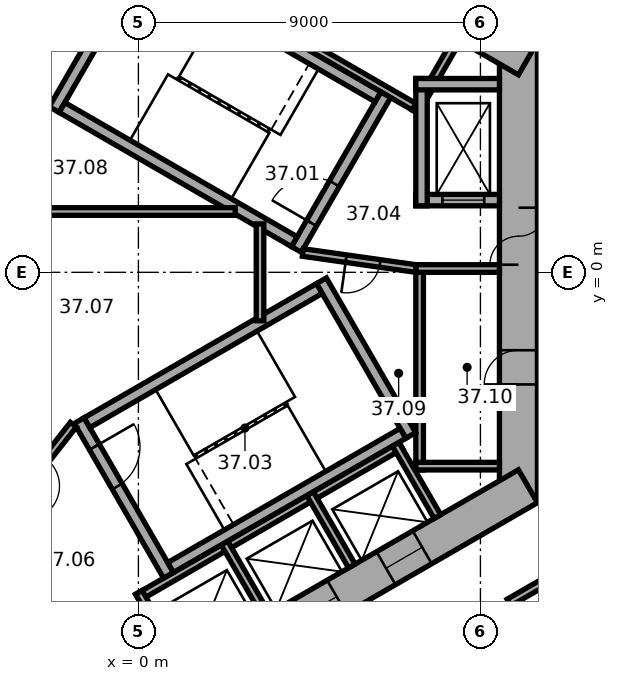
"""IFC4 building model, lengths in metres.
Left out: names, types, materials, properties, quantities, classifications, styles, units other than length and angle.
Written with IfcOpenShell. Run it as: python <this file> out.ifc"""

import sys

from ifc_helpers import new_model, si_unit, direction, frame, frame_2d, origin, place, context, subcontext, project, spatial, rectangle, extrude, element, fill, save


model = new_model("IFC4")
c1 = context("Model", 3, precision=1e-05, world=origin(), true_north=direction((0.0, 1.0)))
c2 = subcontext(c1, "Body", "Model", "MODEL_VIEW")
j1 = project(units=[si_unit("LENGTHUNIT", "METRE"), si_unit("PLANEANGLEUNIT", "RADIAN")], contexts=[c1])
p1 = place(None, origin())
s1 = spatial("IfcSite", under=j1, at=p1, CompositionType="ELEMENT")
p2 = place(p1, origin())
s2 = spatial("IfcBuilding", under=s1, at=p2, CompositionType="ELEMENT")
p3 = place(p2, frame((0.0, 0.0, 154.0)))
s3 = spatial("IfcBuildingStorey", under=s2, at=p3, CompositionType="ELEMENT", Elevation=154.0)
p4 = place(p3, frame((10.0, -6.062, 0.0), z_axis=(0.0, 0.0, 1.0), x_axis=(0.0, 1.0, 0.0)))
e1 = element("IfcWall", 1, at=p4, inside=s3, PredefinedType="SHEAR", context=c2, shape_type="SweptSolid", body=[
    extrude(rectangle(XDim=12.125, YDim=1.0, at=frame_2d((6.062, 0.0))), origin(), (0.0, 0.0, 1.0), 3.7),
])
p5 = place(p4, frame((6.262, 0.0, 0.0)))
e2 = element("IfcOpeningElement", 2, at=p5, cuts=e1, PredefinedType="OPENING", context=c2, shape_type="SweptSolid", body=[
    extrude(rectangle(XDim=1.5, YDim=2.1, at=frame_2d((0.75, 1.05))), frame((0.0, 0.51, 0.0), z_axis=(0.0, -1.0, 0.0), x_axis=(1.0, 0.0, 0.0)), (0.0, 0.0, 1.0), 1.02),
])
p6 = place(p4, frame((3.112, 0.0, 0.0)))
e3 = element("IfcOpeningElement", 3, at=p6, cuts=e1, PredefinedType="OPENING", context=c2, shape_type="SweptSolid", body=[
    extrude(rectangle(XDim=0.9, YDim=2.1, at=frame_2d((0.45, 1.05))), frame((0.0, 0.51, 0.0), z_axis=(0.0, -1.0, 0.0), x_axis=(1.0, 0.0, 0.0)), (0.0, 0.0, 1.0), 1.02),
])
p7 = place(p3, frame((10.25, 5.629, 0.0), z_axis=(0.0, 0.0, 1.0), x_axis=(-0.866022616891, 0.50000482701, 0.0)))
e4 = element("IfcWall", 4, at=p7, inside=s3, PredefinedType="SHEAR", context=c2, shape_type="SweptSolid", body=[
    extrude(rectangle(XDim=12.125, YDim=1.0, at=frame_2d((6.062, 0.0))), origin(), (0.0, 0.0, 1.0), 3.7),
])
p8 = place(p7, frame((4.012, 0.0, 0.0)))
e5 = element("IfcOpeningElement", 5, at=p8, cuts=e4, PredefinedType="OPENING", context=c2, shape_type="SweptSolid", body=[
    extrude(rectangle(XDim=0.9, YDim=2.1, at=frame_2d((0.45, 1.05))), frame((0.0, 0.51, 0.0), z_axis=(0.0, -1.0, 0.0), x_axis=(1.0, 0.0, 0.0)), (0.0, 0.0, 1.0), 1.02),
])
p9 = place(p7, frame((7.912, 0.0, 0.0)))
e6 = element("IfcOpeningElement", 6, at=p9, cuts=e4, PredefinedType="OPENING", context=c2, shape_type="SweptSolid", body=[
    extrude(rectangle(XDim=0.9, YDim=2.1, at=frame_2d((0.45, 1.05))), frame((0.0, 0.51, 0.0), z_axis=(0.0, -1.0, 0.0), x_axis=(1.0, 0.0, 0.0)), (0.0, 0.0, 1.0), 1.02),
])
p10 = place(p3, frame((0.25, 11.691, 0.0), z_axis=(0.0, 0.0, 1.0), x_axis=(-0.866022616891, -0.50000482701, 0.0)))
e7 = element("IfcWall", 7, at=p10, inside=s3, PredefinedType="SHEAR", context=c2, shape_type="SweptSolid", body=[
    extrude(rectangle(XDim=12.125, YDim=1.0, at=frame_2d((6.062, 0.0))), origin(), (0.0, 0.0, 1.0), 3.7),
])
p11 = place(p10, frame((6.262, 0.0, 0.0)))
e8 = element("IfcOpeningElement", 8, at=p11, cuts=e7, PredefinedType="OPENING", context=c2, shape_type="SweptSolid", body=[
    extrude(rectangle(XDim=1.5, YDim=2.1, at=frame_2d((0.75, 1.05))), frame((0.0, 0.51, 0.0), z_axis=(0.0, -1.0, 0.0), x_axis=(1.0, 0.0, 0.0)), (0.0, 0.0, 1.0), 1.02),
])
p12 = place(p10, frame((1.812, 0.0, 0.0)))
e9 = element("IfcOpeningElement", 9, at=p12, cuts=e7, PredefinedType="OPENING", context=c2, shape_type="SweptSolid", body=[
    extrude(rectangle(XDim=0.9, YDim=2.1, at=frame_2d((0.45, 1.05))), frame((0.0, 0.51, 0.0), z_axis=(0.0, -1.0, 0.0), x_axis=(1.0, 0.0, 0.0)), (0.0, 0.0, 1.0), 1.02),
])
p13 = place(p10, frame((4.412, 0.0, 0.0)))
e10 = element("IfcOpeningElement", 10, at=p13, cuts=e7, PredefinedType="OPENING", context=c2, shape_type="SweptSolid", body=[
    extrude(rectangle(XDim=0.9, YDim=2.1, at=frame_2d((0.45, 1.05))), frame((0.0, 0.51, 0.0), z_axis=(0.0, -1.0, 0.0), x_axis=(1.0, 0.0, 0.0)), (0.0, 0.0, 1.0), 1.02),
])
p14 = place(p3, frame((-10.25, -5.629, 0.0), z_axis=(0.0, 0.0, 1.0), x_axis=(0.866022616891, -0.50000482701, 0.0)))
e11 = element("IfcWall", 11, at=p14, inside=s3, PredefinedType="SHEAR", context=c2, shape_type="SweptSolid", body=[
    extrude(rectangle(XDim=12.125, YDim=1.0, at=frame_2d((6.062, 0.0))), origin(), (0.0, 0.0, 1.0), 3.7),
])
p15 = place(p14, frame((6.262, 0.0, 0.0)))
e12 = element("IfcOpeningElement", 12, at=p15, cuts=e11, PredefinedType="OPENING", context=c2, shape_type="SweptSolid", body=[
    extrude(rectangle(XDim=1.5, YDim=2.1, at=frame_2d((0.75, 1.05))), frame((0.0, 0.51, 0.0), z_axis=(0.0, -1.0, 0.0), x_axis=(1.0, 0.0, 0.0)), (0.0, 0.0, 1.0), 1.02),
])
p16 = place(p14, frame((1.712, 0.0, 0.0)))
e13 = element("IfcOpeningElement", 13, at=p16, cuts=e11, PredefinedType="OPENING", context=c2, shape_type="SweptSolid", body=[
    extrude(rectangle(XDim=1.1, YDim=2.1, at=frame_2d((0.55, 1.05))), frame((0.0, 0.51, 0.0), z_axis=(0.0, -1.0, 0.0), x_axis=(1.0, 0.0, 0.0)), (0.0, 0.0, 1.0), 1.02),
])
p17 = place(p14, frame((4.312, 0.0, 0.0)))
e14 = element("IfcOpeningElement", 14, at=p17, cuts=e11, PredefinedType="OPENING", context=c2, shape_type="SweptSolid", body=[
    extrude(rectangle(XDim=1.1, YDim=2.1, at=frame_2d((0.55, 1.05))), frame((0.0, 0.51, 0.0), z_axis=(0.0, -1.0, 0.0), x_axis=(1.0, 0.0, 0.0)), (0.0, 0.0, 1.0), 1.02),
])
p18 = place(p3, frame((-0.25, -11.691, 0.0), z_axis=(0.0, 0.0, 1.0), x_axis=(0.866022616891, 0.50000482701, 0.0)))
e15 = element("IfcWall", 15, at=p18, inside=s3, PredefinedType="SHEAR", context=c2, shape_type="SweptSolid", body=[
    extrude(rectangle(XDim=12.125, YDim=1.0, at=frame_2d((6.062, 0.0))), origin(), (0.0, 0.0, 1.0), 3.7),
])
p19 = place(p18, frame((2.612, 0.0, 0.0)))
e16 = element("IfcOpeningElement", 16, at=p19, cuts=e15, PredefinedType="OPENING", context=c2, shape_type="SweptSolid", body=[
    extrude(rectangle(XDim=1.1, YDim=2.1, at=frame_2d((0.55, 1.05))), frame((0.0, 0.51, 0.0), z_axis=(0.0, -1.0, 0.0), x_axis=(1.0, 0.0, 0.0)), (0.0, 0.0, 1.0), 1.02),
])
p20 = place(p18, frame((5.212, 0.0, 0.0)))
e17 = element("IfcOpeningElement", 17, at=p20, cuts=e15, PredefinedType="OPENING", context=c2, shape_type="SweptSolid", body=[
    extrude(rectangle(XDim=1.1, YDim=2.1, at=frame_2d((0.55, 1.05))), frame((0.0, 0.51, 0.0), z_axis=(0.0, -1.0, 0.0), x_axis=(1.0, 0.0, 0.0)), (0.0, 0.0, 1.0), 1.02),
])
p21 = place(p18, frame((7.812, 0.0, 0.0)))
e18 = element("IfcOpeningElement", 18, at=p21, cuts=e15, PredefinedType="OPENING", context=c2, shape_type="SweptSolid", body=[
    extrude(rectangle(XDim=1.1, YDim=2.1, at=frame_2d((0.55, 1.05))), frame((0.0, 0.51, 0.0), z_axis=(0.0, -1.0, 0.0), x_axis=(1.0, 0.0, 0.0)), (0.0, 0.0, 1.0), 1.02),
])
p22 = place(p3, frame((7.4, -5.2, 0.0), z_axis=(0.0, 0.0, 1.0), x_axis=(0.0, 1.0, 0.0)))
e19 = element("IfcWall", 19, at=p22, inside=s3, PredefinedType="PARTITIONING", context=c2, shape_type="SweptSolid", body=[
    extrude(rectangle(XDim=5.4, YDim=0.2, at=frame_2d((2.7, 0.0))), origin(), (0.0, 0.0, 1.0), 3.42),
])
for number, where, z_axis, x_axis in (
    (20, (7.3, -5.1, 0.0), (0.0, 0.0, 1.0), (1.0, 0.0, 0.0)),
    (21, (7.3, 0.1, 0.0), (0.0, 0.0, 1.0), (1.0, 0.0, 0.0)),
):
    element("IfcWall", number, at=place(p3, frame(where, z_axis=z_axis, x_axis=x_axis)), inside=s3, PredefinedType="PARTITIONING", context=c2, shape_type="SweptSolid", body=[
        extrude(rectangle(XDim=2.2, YDim=0.2, at=frame_2d((1.1, 0.0))), origin(), (0.0, 0.0, 1.0), 3.42),
    ])
p23 = place(p3, frame((7.424, 4.259, 0.0), z_axis=(0.0, 0.0, 1.0), x_axis=(-0.866026010844, 0.49999894854, 0.0)))
e22 = element("IfcWall", 22, at=p23, inside=s3, PredefinedType="PARTITIONING", context=c2, shape_type="SweptSolid", body=[
    extrude(rectangle(XDim=8.0, YDim=0.2, at=frame_2d((4.0, 0.0))), origin(), (0.0, 0.0, 1.0), 3.42),
])
p24 = place(p3, frame((7.287, 4.222, 0.0), z_axis=(0.0, 0.0, 1.0), x_axis=(0.499946605688, 0.86605622881, 0.0)))
e23 = element("IfcWall", 23, at=p24, inside=s3, PredefinedType="PARTITIONING", context=c2, shape_type="SweptSolid", body=[
    extrude(rectangle(XDim=2.2, YDim=0.2, at=frame_2d((1.1, 0.0))), origin(), (0.0, 0.0, 1.0), 3.42),
])
p25 = place(p3, frame((-0.024, -8.559, 0.0), z_axis=(0.0, 0.0, 1.0), x_axis=(0.866026010844, 0.49999894854, 0.0)))
e24 = element("IfcWall", 24, at=p25, inside=s3, PredefinedType="PARTITIONING", context=c2, shape_type="SweptSolid", body=[
    extrude(rectangle(XDim=8.0, YDim=0.2, at=frame_2d((4.0, 0.0))), origin(), (0.0, 0.0, 1.0), 3.42),
])
for number, where, z_axis, x_axis in (
    (25, (0.013, -8.422, 0.0), (0.0, 0.0, 1.0), (0.5, -0.866, 0.0)),
    (26, (2.264, -7.122, 0.0), (0.0, 0.0, 1.0), (0.5, -0.866, 0.0)),
    (27, (4.516, -5.822, 0.0), (0.0, 0.0, 1.0), (0.5, -0.866, 0.0)),
    (28, (6.768, -4.522, 0.0), (0.0, 0.0, 1.0), (0.5, -0.866, 0.0)),
):
    element("IfcWall", number, at=place(p3, frame(where, z_axis=z_axis, x_axis=x_axis)), inside=s3, PredefinedType="PARTITIONING", context=c2, shape_type="SweptSolid", body=[
        extrude(rectangle(XDim=2.2, YDim=0.2, at=frame_2d((1.1, 0.0))), origin(), (0.0, 0.0, 1.0), 3.42),
    ])
p26 = place(p3, frame((4.158, 0.602, 0.0), z_axis=(0.0, 0.0, 1.0), x_axis=(0.499977259774, 0.866038532462, 0.0)))
e29 = element("IfcWall", 29, at=p26, inside=s3, PredefinedType="SHEAR", context=c2, shape_type="SweptSolid", body=[
    extrude(rectangle(XDim=4.7, YDim=0.3, at=frame_2d((2.35, 0.0))), origin(), (0.0, 0.0, 1.0), 3.42),
])
p27 = place(p26, frame((0.8, 0.0, 0.0)))
e30 = element("IfcOpeningElement", 30, at=p27, cuts=e29, PredefinedType="OPENING", context=c2, shape_type="SweptSolid", body=[
    extrude(rectangle(XDim=1.2, YDim=2.1, at=frame_2d((0.6, 1.05))), frame((0.0, 0.16, 0.0), z_axis=(0.0, -1.0, 0.0), x_axis=(1.0, 0.0, 0.0)), (0.0, 0.0, 1.0), 0.32),
])
p28 = place(p3, frame((-2.216, 4.282, 0.0), z_axis=(0.0, 0.0, 1.0), x_axis=(0.499977259774, 0.866038532462, 0.0)))
e31 = element("IfcWall", 31, at=p28, inside=s3, PredefinedType="SHEAR", context=c2, shape_type="SweptSolid", body=[
    extrude(rectangle(XDim=4.7, YDim=0.3, at=frame_2d((2.35, 0.0))), origin(), (0.0, 0.0, 1.0), 3.42),
])
for number, where, z_axis, x_axis in (
    (32, (4.103, 0.807, 0.0), (0.0, 0.0, 1.0), (-0.866, 0.5, 0.0)),
    (33, (6.303, 4.617, 0.0), (0.0, 0.0, 1.0), (-0.866, 0.5, 0.0)),
):
    element("IfcWall", number, at=place(p3, frame(where, z_axis=z_axis, x_axis=x_axis)), inside=s3, PredefinedType="SHEAR", context=c2, shape_type="SweptSolid", body=[
        extrude(rectangle(XDim=7.06, YDim=0.3, at=frame_2d((3.53, 0.0))), origin(), (0.0, 0.0, 1.0), 3.42),
    ])
p29 = place(p3, frame((-1.558, -3.902, 0.0), z_axis=(0.0, 0.0, 1.0), x_axis=(0.499977259774, -0.866038532462, 0.0)))
e34 = element("IfcWall", 34, at=p29, inside=s3, PredefinedType="SHEAR", context=c2, shape_type="SweptSolid", body=[
    extrude(rectangle(XDim=4.7, YDim=0.3, at=frame_2d((2.35, 0.0))), origin(), (0.0, 0.0, 1.0), 3.42),
])
p30 = place(p29, frame((0.8, 0.0, 0.0)))
e35 = element("IfcOpeningElement", 35, at=p30, cuts=e34, PredefinedType="OPENING", context=c2, shape_type="SweptSolid", body=[
    extrude(rectangle(XDim=1.2, YDim=2.1, at=frame_2d((0.6, 1.05))), frame((0.0, 0.16, 0.0), z_axis=(0.0, -1.0, 0.0), x_axis=(1.0, 0.0, 0.0)), (0.0, 0.0, 1.0), 0.32),
])
p31 = place(p3, frame((4.816, -0.222, 0.0), z_axis=(0.0, 0.0, 1.0), x_axis=(0.499977259774, -0.866038532462, 0.0)))
e36 = element("IfcWall", 36, at=p31, inside=s3, PredefinedType="SHEAR", context=c2, shape_type="SweptSolid", body=[
    extrude(rectangle(XDim=4.7, YDim=0.3, at=frame_2d((2.35, 0.0))), origin(), (0.0, 0.0, 1.0), 3.42),
])
for number, where, z_axis, x_axis in (
    (37, (-1.353, -3.957, 0.0), (0.0, 0.0, 1.0), (0.866, 0.5, 0.0)),
    (38, (0.847, -7.767, 0.0), (0.0, 0.0, 1.0), (0.866, 0.5, 0.0)),
):
    element("IfcWall", number, at=place(p3, frame(where, z_axis=z_axis, x_axis=x_axis)), inside=s3, PredefinedType="SHEAR", context=c2, shape_type="SweptSolid", body=[
        extrude(rectangle(XDim=7.06, YDim=0.3, at=frame_2d((3.53, 0.0))), origin(), (0.0, 0.0, 1.0), 3.42),
    ])
p32 = place(p3, frame((7.3, 1.9, 0.0), z_axis=(0.0, 0.0, 1.0), x_axis=(1.0, 0.0, 0.0)))
e39 = element("IfcWall", 39, at=p32, inside=s3, PredefinedType="SHEAR", context=c2, shape_type="SweptSolid", body=[
    extrude(rectangle(XDim=2.2, YDim=0.3, at=frame_2d((1.1, 0.0))), origin(), (0.0, 0.0, 1.0), 3.42),
])
p33 = place(p32, frame((0.7, 0.0, 0.0)))
e40 = element("IfcOpeningElement", 40, at=p33, cuts=e39, PredefinedType="OPENING", context=c2, shape_type="SweptSolid", body=[
    extrude(rectangle(XDim=1.1, YDim=2.1, at=frame_2d((0.55, 1.05))), frame((0.0, 0.16, 0.0), z_axis=(0.0, -1.0, 0.0), x_axis=(1.0, 0.0, 0.0)), (0.0, 0.0, 1.0), 0.32),
])
p34 = place(p3, frame((7.45, 1.75, 0.0), z_axis=(0.0, 0.0, 1.0), x_axis=(0.0, 1.0, 0.0)))
e41 = element("IfcWall", 41, at=p34, inside=s3, PredefinedType="SHEAR", context=c2, shape_type="SweptSolid", body=[
    extrude(rectangle(XDim=3.35, YDim=0.3, at=frame_2d((1.675, 0.0))), origin(), (0.0, 0.0, 1.0), 3.42),
])
p35 = place(p3, frame((7.3, 4.95, 0.0), z_axis=(0.0, 0.0, 1.0), x_axis=(1.0, 0.0, 0.0)))
e42 = element("IfcWall", 42, at=p35, inside=s3, PredefinedType="SHEAR", context=c2, shape_type="SweptSolid", body=[
    extrude(rectangle(XDim=2.2, YDim=0.3, at=frame_2d((1.1, 0.0))), origin(), (0.0, 0.0, 1.0), 3.42),
])
p36 = place(p3, frame((4.327, 0.521, 0.0), z_axis=(0.0, 0.0, 1.0), x_axis=(0.990124376366, -0.14019172346, 0.0)))
e43 = element("IfcWall", 43, at=p36, inside=s3, PredefinedType="PARTITIONING", context=c2, shape_type="SweptSolid", body=[
    extrude(rectangle(XDim=3.002, YDim=0.2, at=frame_2d((1.501, 0.0))), origin(), (0.0, 0.0, 1.0), 3.42),
])
p37 = place(p36, frame((1.15, 0.0, 0.0)))
e44 = element("IfcOpeningElement", 44, at=p37, cuts=e43, PredefinedType="OPENING", context=c2, shape_type="SweptSolid", body=[
    extrude(rectangle(XDim=0.9, YDim=2.1, at=frame_2d((0.45, 1.05))), frame((0.0, 0.11, 0.0), z_axis=(0.0, -1.0, 0.0), x_axis=(1.0, 0.0, 0.0)), (0.0, 0.0, 1.0), 0.22),
])
p38 = place(p3, frame((-1.712, -4.008, 0.0), z_axis=(0.0, 0.0, 1.0), x_axis=(-0.616549420702, -0.787316208287, 0.0)))
e45 = element("IfcWall", 45, at=p38, inside=s3, PredefinedType="PARTITIONING", context=c2, shape_type="SweptSolid", body=[
    extrude(rectangle(XDim=3.002, YDim=0.2, at=frame_2d((1.501, 0.0))), origin(), (0.0, 0.0, 1.0), 3.42),
])
p39 = place(p38, frame((1.15, 0.0, 0.0)))
e46 = element("IfcOpeningElement", 46, at=p39, cuts=e45, PredefinedType="OPENING", context=c2, shape_type="SweptSolid", body=[
    extrude(rectangle(XDim=0.9, YDim=2.1, at=frame_2d((0.45, 1.05))), frame((0.0, 0.11, 0.0), z_axis=(0.0, -1.0, 0.0), x_axis=(1.0, 0.0, 0.0)), (0.0, 0.0, 1.0), 0.22),
])
p40 = place(p3, frame((-2.72, 1.6, 0.0), z_axis=(0.0, 0.0, 1.0), x_axis=(1.0, 0.0, 0.0)))
e47 = element("IfcWall", 47, at=p40, inside=s3, PredefinedType="PARTITIONING", context=c2, shape_type="SweptSolid", body=[
    extrude(rectangle(XDim=5.269, YDim=0.2, at=frame_2d((2.634, 0.0))), origin(), (0.0, 0.0, 1.0), 3.42),
])
p41 = place(p3, frame((3.2, -1.275, 0.0), z_axis=(0.0, 0.0, 1.0), x_axis=(0.0, 1.0, 0.0)))
e48 = element("IfcWall", 48, at=p41, inside=s3, PredefinedType="PARTITIONING", context=c2, shape_type="SweptSolid", body=[
    extrude(rectangle(XDim=2.549, YDim=0.2, at=frame_2d((1.275, 0.0))), origin(), (0.0, 0.0, 1.0), 3.42),
])
p42 = place(p3, frame((9.752, -8.688, 0.0), z_axis=(0.0, 0.0, 1.0), x_axis=(0.865974105138, 0.500088841337, 0.0)))
e49 = element("IfcWall", 49, at=p42, inside=s3, PredefinedType="PARTITIONING", context=c2, shape_type="SweptSolid", body=[
    extrude(rectangle(XDim=1.961, YDim=0.2, at=frame_2d((0.98, 0.0))), origin(), (0.0, 0.0, 1.0), 3.42),
])
p43 = place(p5, origin())
e50 = element("IfcDoor", 50, at=p43, inside=s3, OperationType="DOUBLE_DOOR_SINGLE_SWING", PredefinedType="DOOR", context=c2, shape_type="SweptSolid", body=[
    extrude(rectangle(XDim=1.5, YDim=2.1, at=frame_2d((0.75, 1.05))), frame((0.0, 0.025, 0.0), z_axis=(0.0, -1.0, 0.0), x_axis=(1.0, 0.0, 0.0)), (0.0, 0.0, 1.0), 0.05),
])
fill(e2, e50)
p44 = place(p27, origin())
e51 = element("IfcDoor", 51, at=p44, inside=s3, OperationType="SINGLE_SWING_RIGHT", PredefinedType="DOOR", context=c2, shape_type="SweptSolid", body=[
    extrude(rectangle(XDim=1.2, YDim=2.1, at=frame_2d((0.6, 1.05))), frame((0.0, 0.025, 0.0), z_axis=(0.0, -1.0, 0.0), x_axis=(1.0, 0.0, 0.0)), (0.0, 0.0, 1.0), 0.05),
])
fill(e30, e51)
p45 = place(p30, origin())
e52 = element("IfcDoor", 52, at=p45, inside=s3, OperationType="SINGLE_SWING_RIGHT", PredefinedType="DOOR", context=c2, shape_type="SweptSolid", body=[
    extrude(rectangle(XDim=1.2, YDim=2.1, at=frame_2d((0.6, 1.05))), frame((0.0, 0.025, 0.0), z_axis=(0.0, -1.0, 0.0), x_axis=(1.0, 0.0, 0.0)), (0.0, 0.0, 1.0), 0.05),
])
fill(e35, e52)
p46 = place(p37, origin())
e53 = element("IfcDoor", 53, at=p46, inside=s3, OperationType="SINGLE_SWING_LEFT", PredefinedType="DOOR", context=c2, shape_type="SweptSolid", body=[
    extrude(rectangle(XDim=0.9, YDim=2.1, at=frame_2d((0.45, 1.05))), frame((0.0, 0.025, 0.0), z_axis=(0.0, -1.0, 0.0), x_axis=(1.0, 0.0, 0.0)), (0.0, 0.0, 1.0), 0.05),
])
fill(e44, e53)
p47 = place(p6, origin())
e54 = element("IfcDoor", 54, at=p47, inside=s3, OperationType="SINGLE_SWING_LEFT", PredefinedType="DOOR", context=c2, shape_type="SweptSolid", body=[
    extrude(rectangle(XDim=0.9, YDim=2.1, at=frame_2d((0.45, 1.05))), frame((0.0, 0.025, 0.0), z_axis=(0.0, -1.0, 0.0), x_axis=(1.0, 0.0, 0.0)), (0.0, 0.0, 1.0), 0.05),
])
fill(e3, e54)
p48 = place(p33, origin())
e55 = element("IfcDoor", 55, at=p48, inside=s3, OperationType="DOUBLE_DOOR_SLIDING", PredefinedType="DOOR", context=c2, shape_type="SweptSolid", body=[
    extrude(rectangle(XDim=1.1, YDim=2.1, at=frame_2d((0.55, 1.05))), frame((0.0, 0.025, 0.0), z_axis=(0.0, -1.0, 0.0), x_axis=(1.0, 0.0, 0.0)), (0.0, 0.0, 1.0), 0.05),
])
fill(e40, e55)
p49 = place(p20, origin())
e56 = element("IfcDoor", 56, at=p49, inside=s3, OperationType="DOUBLE_DOOR_SLIDING", PredefinedType="DOOR", context=c2, shape_type="SweptSolid", body=[
    extrude(rectangle(XDim=1.1, YDim=2.1, at=frame_2d((0.55, 1.05))), frame((0.0, 0.025, 0.0), z_axis=(0.0, -1.0, 0.0), x_axis=(1.0, 0.0, 0.0)), (0.0, 0.0, 1.0), 0.05),
])
fill(e17, e56)
p50 = place(p21, origin())
e57 = element("IfcDoor", 57, at=p50, inside=s3, OperationType="DOUBLE_DOOR_SLIDING", PredefinedType="DOOR", context=c2, shape_type="SweptSolid", body=[
    extrude(rectangle(XDim=1.1, YDim=2.1, at=frame_2d((0.55, 1.05))), frame((0.0, 0.025, 0.0), z_axis=(0.0, -1.0, 0.0), x_axis=(1.0, 0.0, 0.0)), (0.0, 0.0, 1.0), 0.05),
])
fill(e18, e57)
save(model, sys.argv[1])
